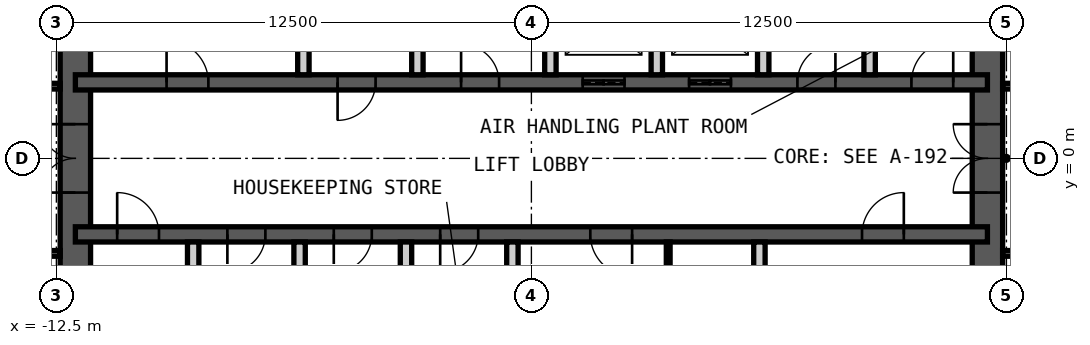
"""IFC4 building model, lengths in metres.
Left out: names, types, materials, properties, quantities, classifications, styles, units other than length and angle.
Written with IfcOpenShell. Run it as: python <this file> out.ifc"""

import sys

from ifc_helpers import new_model, si_unit, direction, frame, frame_2d, origin, place, context, subcontext, project, spatial, rectangle, extrude, element, fill, save


model = new_model("IFC4")
c1 = context("Model", 3, precision=1e-05, world=origin(), true_north=direction((0.0, 1.0)))
c2 = subcontext(c1, "Body", "Model", "MODEL_VIEW")
j1 = project(units=[si_unit("LENGTHUNIT", "METRE"), si_unit("PLANEANGLEUNIT", "RADIAN")], contexts=[c1])
p1 = place(None, origin())
s1 = spatial("IfcSite", under=j1, at=p1, CompositionType="ELEMENT")
p2 = place(p1, origin())
s2 = spatial("IfcBuilding", under=s1, at=p2, CompositionType="ELEMENT")
p3 = place(p2, frame((0.0, 0.0, 325.0)))
s3 = spatial("IfcBuildingStorey", under=s2, at=p3, CompositionType="ELEMENT", Elevation=325.0)
p4 = place(p3, frame((12.0, -9.0, 0.0), z_axis=(0.0, 0.0, 1.0), x_axis=(0.0, 1.0, 0.0)))
e1 = element("IfcWall", 1, at=p4, inside=s3, PredefinedType="SHEAR", context=c2, shape_type="SweptSolid", body=[
    extrude(rectangle(XDim=18.0, YDim=0.8, at=frame_2d((9.0, 0.0))), origin(), (0.0, 0.0, 1.0), 4.2),
])
p5 = place(p4, frame((8.1, 0.0, 0.0)))
e2 = element("IfcOpeningElement", 2, at=p5, cuts=e1, PredefinedType="OPENING", context=c2, shape_type="SweptSolid", body=[
    extrude(rectangle(XDim=1.8, YDim=2.1, at=frame_2d((0.9, 1.05))), frame((0.0, 0.41, 0.0), z_axis=(0.0, -1.0, 0.0), x_axis=(1.0, 0.0, 0.0)), (0.0, 0.0, 1.0), 0.82),
])
p6 = place(p3, frame((-12.0, -9.0, 0.0), z_axis=(0.0, 0.0, 1.0), x_axis=(0.0, 1.0, 0.0)))
e3 = element("IfcWall", 3, at=p6, inside=s3, PredefinedType="SHEAR", context=c2, shape_type="SweptSolid", body=[
    extrude(rectangle(XDim=18.0, YDim=0.8, at=frame_2d((9.0, 0.0))), origin(), (0.0, 0.0, 1.0), 4.2),
])
p7 = place(p6, frame((8.1, 0.0, 0.0)))
e4 = element("IfcOpeningElement", 4, at=p7, cuts=e3, PredefinedType="OPENING", context=c2, shape_type="SweptSolid", body=[
    extrude(rectangle(XDim=1.8, YDim=2.1, at=frame_2d((0.9, 1.05))), frame((0.0, 0.41, 0.0), z_axis=(0.0, -1.0, 0.0), x_axis=(1.0, 0.0, 0.0)), (0.0, 0.0, 1.0), 0.82),
])
p8 = place(p3, frame((-12.0, 2.0, 0.0), z_axis=(0.0, 0.0, 1.0), x_axis=(1.0, 0.0, 0.0)))
e5 = element("IfcWall", 5, at=p8, inside=s3, PredefinedType="SHEAR", context=c2, shape_type="SweptSolid", body=[
    extrude(rectangle(XDim=24.0, YDim=0.4, at=frame_2d((12.0, 0.0))), origin(), (0.0, 0.0, 1.0), 4.2),
])
p9 = place(p8, frame((2.4, 0.0, 0.0)))
e6 = element("IfcOpeningElement", 6, at=p9, cuts=e5, PredefinedType="OPENING", context=c2, shape_type="SweptSolid", body=[
    extrude(rectangle(XDim=1.1, YDim=2.1, at=frame_2d((0.55, 1.05))), frame((0.0, 0.21, 0.0), z_axis=(0.0, -1.0, 0.0), x_axis=(1.0, 0.0, 0.0)), (0.0, 0.0, 1.0), 0.42),
])
p10 = place(p8, frame((22.0, 0.0, 0.0)))
e7 = element("IfcOpeningElement", 7, at=p10, cuts=e5, PredefinedType="OPENING", context=c2, shape_type="SweptSolid", body=[
    extrude(rectangle(XDim=1.1, YDim=2.1, at=frame_2d((0.55, 1.05))), frame((0.0, 0.21, 0.0), z_axis=(0.0, -1.0, 0.0), x_axis=(1.0, 0.0, 0.0)), (0.0, 0.0, 1.0), 0.42),
])
p11 = place(p8, frame((10.15, 0.0, 0.0)))
e8 = element("IfcOpeningElement", 8, at=p11, cuts=e5, PredefinedType="OPENING", context=c2, shape_type="SweptSolid", body=[
    extrude(rectangle(XDim=1.0, YDim=2.1, at=frame_2d((0.5, 1.05))), frame((0.0, 0.21, 0.0), z_axis=(0.0, -1.0, 0.0), x_axis=(1.0, 0.0, 0.0)), (0.0, 0.0, 1.0), 0.42),
])
p12 = place(p8, frame((6.9, 0.0, 0.0)))
e9 = element("IfcOpeningElement", 9, at=p12, cuts=e5, PredefinedType="OPENING", context=c2, shape_type="SweptSolid", body=[
    extrude(rectangle(XDim=1.0, YDim=2.1, at=frame_2d((0.5, 1.05))), frame((0.0, 0.21, 0.0), z_axis=(0.0, -1.0, 0.0), x_axis=(1.0, 0.0, 0.0)), (0.0, 0.0, 1.0), 0.42),
])
p13 = place(p8, frame((13.35, 0.0, 0.0)))
e10 = element("IfcOpeningElement", 10, at=p13, cuts=e5, PredefinedType="OPENING", context=c2, shape_type="SweptSolid", body=[
    extrude(rectangle(XDim=1.1, YDim=2.4, at=frame_2d((0.55, 1.2))), frame((0.0, 0.21, 0.0), z_axis=(0.0, -1.0, 0.0), x_axis=(1.0, 0.0, 0.0)), (0.0, 0.0, 1.0), 0.42),
])
p14 = place(p8, frame((16.15, 0.0, 0.0)))
e11 = element("IfcOpeningElement", 11, at=p14, cuts=e5, PredefinedType="OPENING", context=c2, shape_type="SweptSolid", body=[
    extrude(rectangle(XDim=1.1, YDim=2.4, at=frame_2d((0.55, 1.2))), frame((0.0, 0.21, 0.0), z_axis=(0.0, -1.0, 0.0), x_axis=(1.0, 0.0, 0.0)), (0.0, 0.0, 1.0), 0.42),
])
p15 = place(p8, frame((19.0, 0.0, 0.0)))
e12 = element("IfcOpeningElement", 12, at=p15, cuts=e5, PredefinedType="OPENING", context=c2, shape_type="SweptSolid", body=[
    extrude(rectangle(XDim=1.0, YDim=2.1, at=frame_2d((0.5, 1.05))), frame((0.0, 0.21, 0.0), z_axis=(0.0, -1.0, 0.0), x_axis=(1.0, 0.0, 0.0)), (0.0, 0.0, 1.0), 0.42),
])
p16 = place(p3, frame((-12.0, -2.0, 0.0), z_axis=(0.0, 0.0, 1.0), x_axis=(1.0, 0.0, 0.0)))
e13 = element("IfcWall", 13, at=p16, inside=s3, PredefinedType="SHEAR", context=c2, shape_type="SweptSolid", body=[
    extrude(rectangle(XDim=24.0, YDim=0.4, at=frame_2d((12.0, 0.0))), origin(), (0.0, 0.0, 1.0), 4.2),
])
p17 = place(p16, frame((1.1, 0.0, 0.0)))
e14 = element("IfcOpeningElement", 14, at=p17, cuts=e13, PredefinedType="OPENING", context=c2, shape_type="SweptSolid", body=[
    extrude(rectangle(XDim=1.1, YDim=2.1, at=frame_2d((0.55, 1.05))), frame((0.0, 0.21, 0.0), z_axis=(0.0, -1.0, 0.0), x_axis=(1.0, 0.0, 0.0)), (0.0, 0.0, 1.0), 0.42),
])
p18 = place(p16, frame((13.55, 0.0, 0.0)))
e15 = element("IfcOpeningElement", 15, at=p18, cuts=e13, PredefinedType="OPENING", context=c2, shape_type="SweptSolid", body=[
    extrude(rectangle(XDim=1.1, YDim=2.1, at=frame_2d((0.55, 1.05))), frame((0.0, 0.21, 0.0), z_axis=(0.0, -1.0, 0.0), x_axis=(1.0, 0.0, 0.0)), (0.0, 0.0, 1.0), 0.42),
])
p19 = place(p16, frame((20.7, 0.0, 0.0)))
e16 = element("IfcOpeningElement", 16, at=p19, cuts=e13, PredefinedType="OPENING", context=c2, shape_type="SweptSolid", body=[
    extrude(rectangle(XDim=1.1, YDim=2.1, at=frame_2d((0.55, 1.05))), frame((0.0, 0.21, 0.0), z_axis=(0.0, -1.0, 0.0), x_axis=(1.0, 0.0, 0.0)), (0.0, 0.0, 1.0), 0.42),
])
p20 = place(p16, frame((4.0, 0.0, 0.0)))
e17 = element("IfcOpeningElement", 17, at=p20, cuts=e13, PredefinedType="OPENING", context=c2, shape_type="SweptSolid", body=[
    extrude(rectangle(XDim=1.0, YDim=2.1, at=frame_2d((0.5, 1.05))), frame((0.0, 0.21, 0.0), z_axis=(0.0, -1.0, 0.0), x_axis=(1.0, 0.0, 0.0)), (0.0, 0.0, 1.0), 0.42),
])
p21 = place(p16, frame((6.8, 0.0, 0.0)))
e18 = element("IfcOpeningElement", 18, at=p21, cuts=e13, PredefinedType="OPENING", context=c2, shape_type="SweptSolid", body=[
    extrude(rectangle(XDim=1.0, YDim=2.1, at=frame_2d((0.5, 1.05))), frame((0.0, 0.21, 0.0), z_axis=(0.0, -1.0, 0.0), x_axis=(1.0, 0.0, 0.0)), (0.0, 0.0, 1.0), 0.42),
])
p22 = place(p16, frame((9.6, 0.0, 0.0)))
e19 = element("IfcOpeningElement", 19, at=p22, cuts=e13, PredefinedType="OPENING", context=c2, shape_type="SweptSolid", body=[
    extrude(rectangle(XDim=1.0, YDim=2.1, at=frame_2d((0.5, 1.05))), frame((0.0, 0.21, 0.0), z_axis=(0.0, -1.0, 0.0), x_axis=(1.0, 0.0, 0.0)), (0.0, 0.0, 1.0), 0.42),
])
for number, where, z_axis, x_axis in (
    (20, (-6.0, 2.2, 0.0), (0.0, 0.0, 1.0), (0.0, 1.0, 0.0)),
    (21, (-3.0, 2.2, 0.0), (0.0, 0.0, 1.0), (0.0, 1.0, 0.0)),
    (22, (0.5, 2.2, 0.0), (0.0, 0.0, 1.0), (0.0, 1.0, 0.0)),
    (23, (3.3, 2.2, 0.0), (0.0, 0.0, 1.0), (0.0, 1.0, 0.0)),
    (24, (6.1, 2.2, 0.0), (0.0, 0.0, 1.0), (0.0, 1.0, 0.0)),
    (25, (8.9, 2.2, 0.0), (0.0, 0.0, 1.0), (0.0, 1.0, 0.0)),
    (26, (-8.9, -4.85, 0.0), (0.0, 0.0, 1.0), (0.0, 1.0, 0.0)),
    (27, (-6.1, -4.85, 0.0), (0.0, 0.0, 1.0), (0.0, 1.0, 0.0)),
    (28, (-3.3, -4.85, 0.0), (0.0, 0.0, 1.0), (0.0, 1.0, 0.0)),
    (29, (-0.5, -4.85, 0.0), (0.0, 0.0, 1.0), (0.0, 1.0, 0.0)),
    (30, (6.0, -4.85, 0.0), (0.0, 0.0, 1.0), (0.0, 1.0, 0.0)),
):
    element("IfcWall", number, at=place(p3, frame(where, z_axis=z_axis, x_axis=x_axis)), inside=s3, PredefinedType="PARTITIONING", context=c2, shape_type="SweptSolid", body=[
        extrude(rectangle(XDim=2.65, YDim=0.3, at=frame_2d((1.325, 0.0))), origin(), (0.0, 0.0, 1.0), 3.98),
    ])
p23 = place(p3, frame((3.6, -4.85, 0.0), z_axis=(0.0, 0.0, 1.0), x_axis=(0.0, 1.0, 0.0)))
e31 = element("IfcWall", 31, at=p23, inside=s3, PredefinedType="PARTITIONING", context=c2, shape_type="SweptSolid", body=[
    extrude(rectangle(XDim=2.65, YDim=0.1, at=frame_2d((1.325, 0.0))), origin(), (0.0, 0.0, 1.0), 3.98),
])
p24 = place(p23, frame((0.1, 0.0, 0.0)))
e32 = element("IfcOpeningElement", 32, at=p24, cuts=e31, PredefinedType="OPENING", context=c2, shape_type="SweptSolid", body=[
    extrude(rectangle(XDim=1.0, YDim=2.4, at=frame_2d((0.5, 1.2))), frame((0.0, 0.06, 0.0), z_axis=(0.0, -1.0, 0.0), x_axis=(1.0, 0.0, 0.0)), (0.0, 0.0, 1.0), 0.12),
])
p25 = place(p3, frame((12.4, 1.9, 0.0), z_axis=(0.0, 0.0, 1.0), x_axis=(1.0, 0.0, 0.0)))
e33 = element("IfcWall", 33, at=p25, inside=s3, PredefinedType="PARTITIONING", context=c2, shape_type="SweptSolid", body=[
    extrude(rectangle(XDim=2.2, YDim=0.15, at=frame_2d((1.1, 0.0))), origin(), (0.0, 0.0, 1.0), 2.93),
])
p26 = place(p3, frame((12.4, -2.5, 0.0), z_axis=(0.0, 0.0, 1.0), x_axis=(1.0, 0.0, 0.0)))
e34 = element("IfcWall", 34, at=p26, inside=s3, PredefinedType="PARTITIONING", context=c2, shape_type="SweptSolid", body=[
    extrude(rectangle(XDim=2.2, YDim=0.15, at=frame_2d((1.1, 0.0))), origin(), (0.0, 0.0, 1.0), 3.33),
])
for number, where, z_axis, x_axis in (
    (35, (-12.4, 1.9, 0.0), (0.0, 0.0, 1.0), (-1.0, 0.0, 0.0)),
    (36, (-12.4, -2.5, 0.0), (0.0, 0.0, 1.0), (-1.0, 0.0, 0.0)),
):
    element("IfcWall", number, at=place(p3, frame(where, z_axis=z_axis, x_axis=x_axis)), inside=s3, PredefinedType="PARTITIONING", context=c2, shape_type="SweptSolid", body=[
        extrude(rectangle(XDim=2.2, YDim=0.15, at=frame_2d((1.1, 0.0))), origin(), (0.0, 0.0, 1.0), 3.53),
    ])
p27 = place(p9, origin())
e37 = element("IfcDoor", 37, at=p27, inside=s3, OperationType="SINGLE_SWING_RIGHT", PredefinedType="DOOR", context=c2, shape_type="SweptSolid", body=[
    extrude(rectangle(XDim=1.1, YDim=2.1, at=frame_2d((0.55, 1.05))), frame((0.0, 0.025, 0.0), z_axis=(0.0, -1.0, 0.0), x_axis=(1.0, 0.0, 0.0)), (0.0, 0.0, 1.0), 0.05),
])
fill(e6, e37)
p28 = place(p17, origin())
e38 = element("IfcDoor", 38, at=p28, inside=s3, OperationType="SINGLE_SWING_RIGHT", PredefinedType="DOOR", context=c2, shape_type="SweptSolid", body=[
    extrude(rectangle(XDim=1.1, YDim=2.1, at=frame_2d((0.55, 1.05))), frame((0.0, 0.025, 0.0), z_axis=(0.0, -1.0, 0.0), x_axis=(1.0, 0.0, 0.0)), (0.0, 0.0, 1.0), 0.05),
])
fill(e14, e38)
p29 = place(p10, origin())
e39 = element("IfcDoor", 39, at=p29, inside=s3, OperationType="SINGLE_SWING_LEFT", PredefinedType="DOOR", context=c2, shape_type="SweptSolid", body=[
    extrude(rectangle(XDim=1.1, YDim=2.1, at=frame_2d((0.55, 1.05))), frame((0.0, 0.025, 0.0), z_axis=(0.0, -1.0, 0.0), x_axis=(1.0, 0.0, 0.0)), (0.0, 0.0, 1.0), 0.05),
])
fill(e7, e39)
p30 = place(p11, origin())
e40 = element("IfcDoor", 40, at=p30, inside=s3, OperationType="SINGLE_SWING_RIGHT", PredefinedType="DOOR", context=c2, shape_type="SweptSolid", body=[
    extrude(rectangle(XDim=1.0, YDim=2.1, at=frame_2d((0.5, 1.05))), frame((0.0, 0.025, 0.0), z_axis=(0.0, -1.0, 0.0), x_axis=(1.0, 0.0, 0.0)), (0.0, 0.0, 1.0), 0.05),
])
fill(e8, e40)
p31 = place(p18, origin())
e41 = element("IfcDoor", 41, at=p31, inside=s3, OperationType="SINGLE_SWING_RIGHT", PredefinedType="DOOR", context=c2, shape_type="SweptSolid", body=[
    extrude(rectangle(XDim=1.1, YDim=2.1, at=frame_2d((0.55, 1.05))), frame((0.0, 0.025, 0.0), z_axis=(0.0, -1.0, 0.0), x_axis=(1.0, 0.0, 0.0)), (0.0, 0.0, 1.0), 0.05),
])
fill(e15, e41)
p32 = place(p19, origin())
e42 = element("IfcDoor", 42, at=p32, inside=s3, OperationType="SINGLE_SWING_LEFT", PredefinedType="DOOR", context=c2, shape_type="SweptSolid", body=[
    extrude(rectangle(XDim=1.1, YDim=2.1, at=frame_2d((0.55, 1.05))), frame((0.0, 0.025, 0.0), z_axis=(0.0, -1.0, 0.0), x_axis=(1.0, 0.0, 0.0)), (0.0, 0.0, 1.0), 0.05),
])
fill(e16, e42)
p33 = place(p5, origin())
e43 = element("IfcDoor", 43, at=p33, inside=s3, OperationType="DOUBLE_DOOR_DOUBLE_SWING", PredefinedType="DOOR", context=c2, shape_type="SweptSolid", body=[
    extrude(rectangle(XDim=1.8, YDim=2.1, at=frame_2d((0.9, 1.05))), frame((0.0, 0.025, 0.0), z_axis=(0.0, -1.0, 0.0), x_axis=(1.0, 0.0, 0.0)), (0.0, 0.0, 1.0), 0.05),
])
fill(e2, e43)
p34 = place(p7, origin())
e44 = element("IfcDoor", 44, at=p34, inside=s3, OperationType="DOUBLE_DOOR_DOUBLE_SWING", PredefinedType="DOOR", context=c2, shape_type="SweptSolid", body=[
    extrude(rectangle(XDim=1.8, YDim=2.1, at=frame_2d((0.9, 1.05))), frame((0.0, 0.025, 0.0), z_axis=(0.0, -1.0, 0.0), x_axis=(1.0, 0.0, 0.0)), (0.0, 0.0, 1.0), 0.05),
])
fill(e4, e44)
p35 = place(p12, origin())
e45 = element("IfcDoor", 45, at=p35, inside=s3, OperationType="SINGLE_SWING_LEFT", PredefinedType="DOOR", context=c2, shape_type="SweptSolid", body=[
    extrude(rectangle(XDim=1.0, YDim=2.1, at=frame_2d((0.5, 1.05))), frame((0.0, 0.025, 0.0), z_axis=(0.0, -1.0, 0.0), x_axis=(1.0, 0.0, 0.0)), (0.0, 0.0, 1.0), 0.05),
])
fill(e9, e45)
p36 = place(p13, origin())
e46 = element("IfcDoor", 46, at=p36, inside=s3, OperationType="DOUBLE_DOOR_SLIDING", PredefinedType="DOOR", context=c2, shape_type="SweptSolid", body=[
    extrude(rectangle(XDim=1.1, YDim=2.4, at=frame_2d((0.55, 1.2))), frame((0.0, 0.025, 0.0), z_axis=(0.0, -1.0, 0.0), x_axis=(1.0, 0.0, 0.0)), (0.0, 0.0, 1.0), 0.05),
])
fill(e10, e46)
p37 = place(p14, origin())
e47 = element("IfcDoor", 47, at=p37, inside=s3, OperationType="DOUBLE_DOOR_SLIDING", PredefinedType="DOOR", context=c2, shape_type="SweptSolid", body=[
    extrude(rectangle(XDim=1.1, YDim=2.4, at=frame_2d((0.55, 1.2))), frame((0.0, 0.025, 0.0), z_axis=(0.0, -1.0, 0.0), x_axis=(1.0, 0.0, 0.0)), (0.0, 0.0, 1.0), 0.05),
])
fill(e11, e47)
p38 = place(p15, origin())
e48 = element("IfcDoor", 48, at=p38, inside=s3, OperationType="SINGLE_SWING_LEFT", PredefinedType="DOOR", context=c2, shape_type="SweptSolid", body=[
    extrude(rectangle(XDim=1.0, YDim=2.1, at=frame_2d((0.5, 1.05))), frame((0.0, 0.025, 0.0), z_axis=(0.0, -1.0, 0.0), x_axis=(1.0, 0.0, 0.0)), (0.0, 0.0, 1.0), 0.05),
])
fill(e12, e48)
p39 = place(p20, origin())
e49 = element("IfcDoor", 49, at=p39, inside=s3, OperationType="SINGLE_SWING_LEFT", PredefinedType="DOOR", context=c2, shape_type="SweptSolid", body=[
    extrude(rectangle(XDim=1.0, YDim=2.1, at=frame_2d((0.5, 1.05))), frame((0.0, 0.025, 0.0), z_axis=(0.0, -1.0, 0.0), x_axis=(1.0, 0.0, 0.0)), (0.0, 0.0, 1.0), 0.05),
])
fill(e17, e49)
p40 = place(p21, origin())
e50 = element("IfcDoor", 50, at=p40, inside=s3, OperationType="SINGLE_SWING_LEFT", PredefinedType="DOOR", context=c2, shape_type="SweptSolid", body=[
    extrude(rectangle(XDim=1.0, YDim=2.1, at=frame_2d((0.5, 1.05))), frame((0.0, 0.025, 0.0), z_axis=(0.0, -1.0, 0.0), x_axis=(1.0, 0.0, 0.0)), (0.0, 0.0, 1.0), 0.05),
])
fill(e18, e50)
p41 = place(p22, origin())
e51 = element("IfcDoor", 51, at=p41, inside=s3, OperationType="SINGLE_SWING_LEFT", PredefinedType="DOOR", context=c2, shape_type="SweptSolid", body=[
    extrude(rectangle(XDim=1.0, YDim=2.1, at=frame_2d((0.5, 1.05))), frame((0.0, 0.025, 0.0), z_axis=(0.0, -1.0, 0.0), x_axis=(1.0, 0.0, 0.0)), (0.0, 0.0, 1.0), 0.05),
])
fill(e19, e51)
save(model, sys.argv[1])
